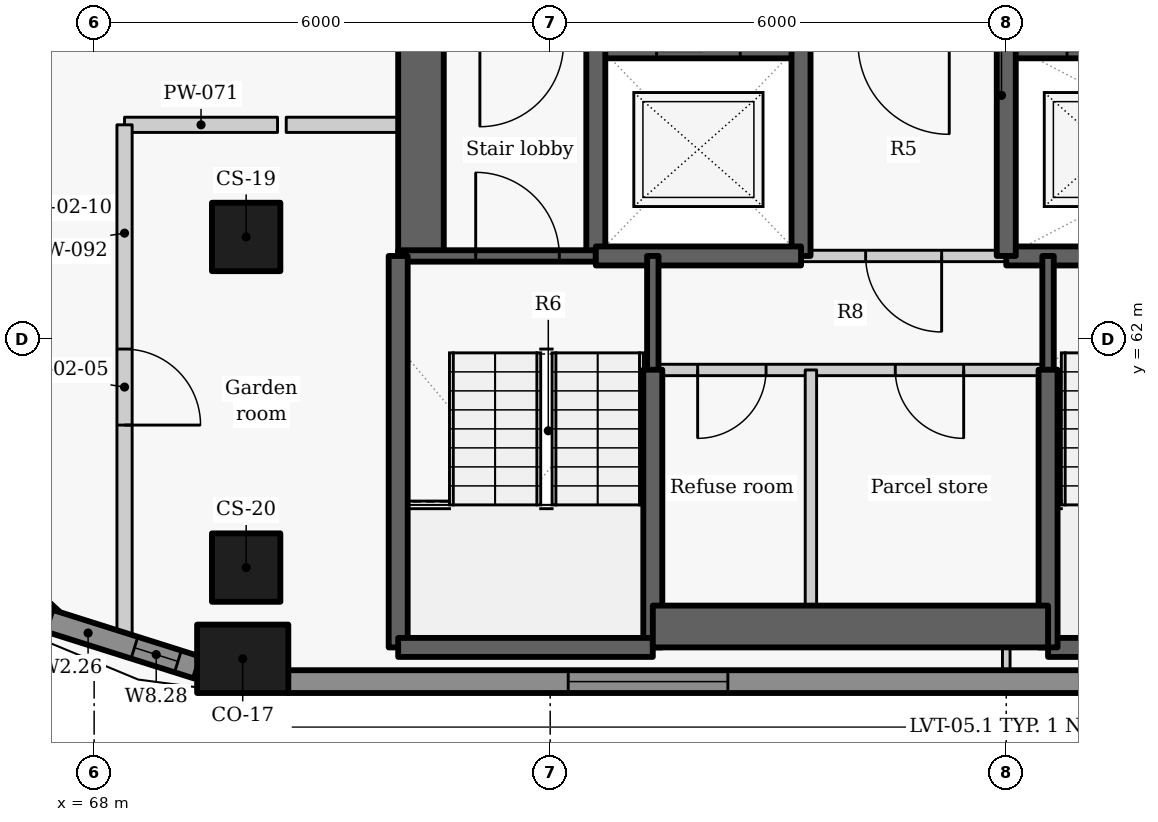
"""IFC4 building model, lengths in metres.
Left out: names, types, materials, properties, quantities, classifications, styles, units other than length and angle.
Written with IfcOpenShell. Run it as: python <this file> out.ifc"""

import sys

from ifc_helpers import new_model, si_unit, direction, frame, frame_2d, origin, origin_2d, place, context, subcontext, project, spatial, rectangle, extrude, element, fill, save


model = new_model("IFC4")
c1 = context("Model", 3, precision=1e-05, world=origin(), true_north=direction((0.0, 1.0)))
c2 = subcontext(c1, "Body", "Model", "MODEL_VIEW")
j1 = project(units=[si_unit("LENGTHUNIT", "METRE"), si_unit("PLANEANGLEUNIT", "RADIAN")], contexts=[c1])
p1 = place(None, origin())
s1 = spatial("IfcSite", under=j1, at=p1, CompositionType="ELEMENT")
p2 = place(p1, origin())
s2 = spatial("IfcBuilding", under=s1, at=p2, CompositionType="ELEMENT")
p3 = place(p2, frame((0.0, 0.0, 213.0)))
s3 = spatial("IfcBuildingStorey", under=s2, at=p3, CompositionType="ELEMENT", Elevation=213.0)
p4 = place(p3, frame((69.955, 57.8, 0.0), z_axis=(0.0, 0.0, 1.0), x_axis=(1.0, 0.0, 0.0)))
e1 = element("IfcColumn", 1, at=p4, inside=s3, PredefinedType="COLUMN", context=c2, shape_type="SweptSolid", body=[
    extrude(rectangle(XDim=1.2, YDim=0.9, at=origin_2d()), origin(), (0.0, 0.0, 1.0), 3.3),
])
for number, where, z_axis, x_axis in (
    (2, (70.0, 63.35, 0.0), (0.0, 0.0, 1.0), (0.0, -1.0, 0.0)),
    (3, (70.0, 59.0, 0.0), (0.0, 0.0, 1.0), (0.0, -1.0, 0.0)),
):
    element("IfcColumn", number, at=place(p3, frame(where, z_axis=z_axis, x_axis=x_axis)), inside=s3, PredefinedType="COLUMN", context=c2, shape_type="SweptSolid", body=[
        extrude(rectangle(XDim=0.9, YDim=0.9, at=origin_2d()), origin(), (0.0, 0.0, 1.0), 3.3),
    ])
p5 = place(p3, frame((66.022, 59.622, 0.0), z_axis=(0.0, 0.0, 1.0), x_axis=(0.734627852992, -0.678470277616, 0.0)))
e4 = element("IfcWall", 4, at=p5, inside=s3, PredefinedType="SOLIDWALL", context=c2, shape_type="SweptSolid", body=[
    extrude(rectangle(XDim=2.026, YDim=0.3, at=frame_2d((1.013, 0.0))), origin(), (0.0, 0.0, 1.0), 2.425),
])
p6 = place(p5, frame((0.313, 0.0, 0.9)))
e5 = element("IfcOpeningElement", 5, at=p6, cuts=e4, PredefinedType="OPENING", context=c2, shape_type="SweptSolid", body=[
    extrude(rectangle(XDim=0.6, YDim=1.1, at=frame_2d((0.3, 0.55))), frame((0.0, 0.16, 0.0), z_axis=(0.0, -1.0, 0.0), x_axis=(1.0, 0.0, 0.0)), (0.0, 0.0, 1.0), 0.32),
])
p7 = place(p3, frame((67.406, 58.302, 0.0), z_axis=(0.0, 0.0, 1.0), x_axis=(0.953537608367, -0.301274010545, 0.0)))
e6 = element("IfcWall", 6, at=p7, inside=s3, PredefinedType="SOLIDWALL", context=c2, shape_type="SweptSolid", body=[
    extrude(rectangle(XDim=2.048, YDim=0.3, at=frame_2d((1.024, 0.0))), origin(), (0.0, 0.0, 1.0), 2.425),
])
p8 = place(p7, frame((1.18, 0.0, 0.9)))
e7 = element("IfcOpeningElement", 7, at=p8, cuts=e6, PredefinedType="OPENING", context=c2, shape_type="SweptSolid", body=[
    extrude(rectangle(XDim=0.6, YDim=1.1, at=frame_2d((0.3, 0.55))), frame((0.0, 0.16, 0.0), z_axis=(0.0, -1.0, 0.0), x_axis=(1.0, 0.0, 0.0)), (0.0, 0.0, 1.0), 0.32),
])
p9 = place(p3, frame((70.551, 57.5, 0.0), z_axis=(0.0, 0.0, 1.0), x_axis=(1.0, 0.0, 0.0)))
e8 = element("IfcWall", 8, at=p9, inside=s3, PredefinedType="SOLIDWALL", context=c2, shape_type="SweptSolid", body=[
    extrude(rectangle(XDim=18.893, YDim=0.3, at=frame_2d((9.446, 0.0))), origin(), (0.0, 0.0, 1.0), 2.425),
])
p10 = place(p9, frame((3.687, 0.0, 0.9)))
e9 = element("IfcOpeningElement", 9, at=p10, cuts=e8, PredefinedType="OPENING", context=c2, shape_type="SweptSolid", body=[
    extrude(rectangle(XDim=2.1, YDim=1.1, at=frame_2d((1.05, 0.55))), frame((0.0, 0.16, 0.0), z_axis=(0.0, -1.0, 0.0), x_axis=(1.0, 0.0, 0.0)), (0.0, 0.0, 1.0), 0.32),
])
p11 = place(p9, frame((13.109, 0.0, 0.9)))
e10 = element("IfcOpeningElement", 10, at=p11, cuts=e8, PredefinedType="OPENING", context=c2, shape_type="SweptSolid", body=[
    extrude(rectangle(XDim=2.1, YDim=1.1, at=frame_2d((1.05, 0.55))), frame((0.0, 0.16, 0.0), z_axis=(0.0, -1.0, 0.0), x_axis=(1.0, 0.0, 0.0)), (0.0, 0.0, 1.0), 0.32),
])
p12 = place(p3, frame((72.3, 63.1, -0.275), z_axis=(0.0, 0.0, 1.0), x_axis=(0.0, 1.0, 0.0)))
e11 = element("IfcWall", 11, at=p12, inside=s3, PredefinedType="SHEAR", context=c2, shape_type="SweptSolid", body=[
    extrude(rectangle(XDim=9.1, YDim=0.6, at=frame_2d((4.55, 0.0))), origin(), (0.0, 0.0, 1.0), 3.3),
])
p13 = place(p12, frame((3.748, 0.0, 0.275)))
e12 = element("IfcOpeningElement", 12, at=p13, cuts=e11, PredefinedType="OPENING", context=c2, shape_type="SweptSolid", body=[
    extrude(rectangle(XDim=1.5, YDim=2.1, at=frame_2d((0.75, 1.05))), frame((0.0, 0.31, 0.0), z_axis=(0.0, -1.0, 0.0), x_axis=(1.0, 0.0, 0.0)), (0.0, 0.0, 1.0), 0.62),
])
p14 = place(p3, frame((74.597, 65.9, -0.275), z_axis=(0.0, 0.0, 1.0), x_axis=(1.0, 0.0, 0.0)))
e13 = element("IfcWall", 13, at=p14, inside=s3, PredefinedType="SHEAR", context=c2, shape_type="SweptSolid", body=[
    extrude(rectangle(XDim=2.706, YDim=0.4, at=frame_2d((1.353, 0.0))), origin(), (0.0, 0.0, 1.0), 3.3),
])
p15 = place(p14, frame((0.803, 0.0, 0.275)))
e14 = element("IfcOpeningElement", 14, at=p15, cuts=e13, PredefinedType="OPENING", context=c2, shape_type="SweptSolid", body=[
    extrude(rectangle(XDim=1.1, YDim=2.1, at=frame_2d((0.55, 1.05))), frame((0.0, 0.21, 0.0), z_axis=(0.0, -1.0, 0.0), x_axis=(1.0, 0.0, 0.0)), (0.0, 0.0, 1.0), 0.42),
])
p16 = place(p3, frame((79.997, 65.9, -0.275), z_axis=(0.0, 0.0, 1.0), x_axis=(1.0, 0.0, 0.0)))
e15 = element("IfcWall", 15, at=p16, inside=s3, PredefinedType="SHEAR", context=c2, shape_type="SweptSolid", body=[
    extrude(rectangle(XDim=5.406, YDim=0.4, at=frame_2d((2.703, 0.0))), origin(), (0.0, 0.0, 1.0), 3.3),
])
p17 = place(p16, frame((0.803, 0.0, 0.275)))
e16 = element("IfcOpeningElement", 16, at=p17, cuts=e15, PredefinedType="OPENING", context=c2, shape_type="SweptSolid", body=[
    extrude(rectangle(XDim=1.1, YDim=2.1, at=frame_2d((0.55, 1.05))), frame((0.0, 0.21, 0.0), z_axis=(0.0, -1.0, 0.0), x_axis=(1.0, 0.0, 0.0)), (0.0, 0.0, 1.0), 0.42),
])
p18 = place(p3, frame((74.6, 63.1, -0.275), z_axis=(0.0, 0.0, 1.0), x_axis=(0.0, 1.0, 0.0)))
e17 = element("IfcWall", 17, at=p18, inside=s3, PredefinedType="SHEAR", context=c2, shape_type="SweptSolid", body=[
    extrude(rectangle(XDim=2.8, YDim=0.25, at=frame_2d((1.4, 0.0))), origin(), (0.0, 0.0, 1.0), 3.3),
])
p19 = place(p3, frame((72.0, 63.1, -0.275), z_axis=(0.0, 0.0, 1.0), x_axis=(1.0, 0.0, 0.0)))
e18 = element("IfcWall", 18, at=p19, inside=s3, PredefinedType="SHEAR", context=c2, shape_type="SweptSolid", body=[
    extrude(rectangle(XDim=2.6, YDim=0.15, at=frame_2d((1.3, 0.0))), origin(), (0.0, 0.0, 1.0), 3.3),
])
p20 = place(p19, frame((1.02, 0.0, 0.275)))
e19 = element("IfcOpeningElement", 19, at=p20, cuts=e18, PredefinedType="OPENING", context=c2, shape_type="SweptSolid", body=[
    extrude(rectangle(XDim=1.1, YDim=2.1, at=frame_2d((0.55, 1.05))), frame((0.0, 0.085, 0.0), z_axis=(0.0, -1.0, 0.0), x_axis=(1.0, 0.0, 0.0)), (0.0, 0.0, 1.0), 0.17),
])
p21 = place(p3, frame((77.3, 63.1, -0.275), z_axis=(0.0, 0.0, 1.0), x_axis=(0.0, 1.0, 0.0)))
e20 = element("IfcWall", 20, at=p21, inside=s3, PredefinedType="SHEAR", context=c2, shape_type="SweptSolid", body=[
    extrude(rectangle(XDim=2.8, YDim=0.25, at=frame_2d((1.4, 0.0))), origin(), (0.0, 0.0, 1.0), 3.3),
])
p22 = place(p3, frame((74.6, 63.1, -0.275), z_axis=(0.0, 0.0, 1.0), x_axis=(1.0, 0.0, 0.0)))
e21 = element("IfcWall", 21, at=p22, inside=s3, PredefinedType="SHEAR", context=c2, shape_type="SweptSolid", body=[
    extrude(rectangle(XDim=2.7, YDim=0.25, at=frame_2d((1.35, 0.0))), origin(), (0.0, 0.0, 1.0), 3.3),
])
p23 = place(p3, frame((80.0, 63.1, -0.275), z_axis=(0.0, 0.0, 1.0), x_axis=(1.0, 0.0, 0.0)))
e22 = element("IfcWall", 22, at=p23, inside=s3, PredefinedType="SHEAR", context=c2, shape_type="SweptSolid", body=[
    extrude(rectangle(XDim=8.0, YDim=0.25, at=frame_2d((4.0, 0.0))), origin(), (0.0, 0.0, 1.0), 3.3),
])
p24 = place(p23, frame((3.849, 0.0, 0.275)))
e23 = element("IfcOpeningElement", 23, at=p24, cuts=e22, PredefinedType="OPENING", context=c2, shape_type="SweptSolid", body=[
    extrude(rectangle(XDim=1.1, YDim=2.1, at=frame_2d((0.55, 1.05))), frame((0.0, 0.135, 0.0), z_axis=(0.0, -1.0, 0.0), x_axis=(1.0, 0.0, 0.0)), (0.0, 0.0, 1.0), 0.27),
])
p25 = place(p3, frame((80.0, 63.1, -0.275), z_axis=(0.0, 0.0, 1.0), x_axis=(0.0, 1.0, 0.0)))
e24 = element("IfcWall", 24, at=p25, inside=s3, PredefinedType="SHEAR", context=c2, shape_type="SweptSolid", body=[
    extrude(rectangle(XDim=2.8, YDim=0.25, at=frame_2d((1.4, 0.0))), origin(), (0.0, 0.0, 1.0), 3.3),
])
p26 = place(p3, frame((80.0, 63.1, 0.0), z_axis=(0.0, 0.0, 1.0), x_axis=(-1.0, 0.0, 0.0)))
e25 = element("IfcWall", 25, at=p26, inside=s3, PredefinedType="PARTITIONING", context=c2, shape_type="SweptSolid", body=[
    extrude(rectangle(XDim=2.7, YDim=0.15, at=frame_2d((1.35, 0.0))), origin(), (0.0, 0.0, 1.0), 3.025),
])
p27 = place(p26, frame((0.85, 0.0, 0.0)))
e26 = element("IfcOpeningElement", 26, at=p27, cuts=e25, PredefinedType="OPENING", context=c2, shape_type="SweptSolid", body=[
    extrude(rectangle(XDim=1.0, YDim=2.1, at=frame_2d((0.5, 1.05))), frame((0.0, 0.085, 0.0), z_axis=(0.0, -1.0, 0.0), x_axis=(1.0, 0.0, 0.0)), (0.0, 0.0, 1.0), 0.17),
])
p28 = place(p3, frame((75.35, 61.597, -0.275), z_axis=(0.0, 0.0, 1.0), x_axis=(0.0, 1.0, 0.0)))
e27 = element("IfcWall", 27, at=p28, inside=s3, PredefinedType="SHEAR", context=c2, shape_type="SweptSolid", body=[
    extrude(rectangle(XDim=1.503, YDim=0.15, at=frame_2d((0.751, 0.0))), origin(), (0.0, 0.0, 1.0), 3.3),
])
p29 = place(p3, frame((75.35, 57.95, -0.275), z_axis=(0.0, 0.0, 1.0), x_axis=(0.0, 1.0, 0.0)))
e28 = element("IfcWall", 28, at=p29, inside=s3, PredefinedType="SHEAR", context=c2, shape_type="SweptSolid", body=[
    extrude(rectangle(XDim=3.653, YDim=0.25, at=frame_2d((1.827, 0.0))), origin(), (0.0, 0.0, 1.0), 3.3),
])
p30 = place(p3, frame((72.0, 57.95, -0.275), z_axis=(0.0, 0.0, 1.0), x_axis=(0.0, 1.0, 0.0)))
e29 = element("IfcWall", 29, at=p30, inside=s3, PredefinedType="SHEAR", context=c2, shape_type="SweptSolid", body=[
    extrude(rectangle(XDim=5.15, YDim=0.25, at=frame_2d((2.575, 0.0))), origin(), (0.0, 0.0, 1.0), 3.3),
])
p31 = place(p3, frame((72.0, 57.95, -0.275), z_axis=(0.0, 0.0, 1.0), x_axis=(1.0, 0.0, 0.0)))
e30 = element("IfcWall", 30, at=p31, inside=s3, PredefinedType="SHEAR", context=c2, shape_type="SweptSolid", body=[
    extrude(rectangle(XDim=3.35, YDim=0.25, at=frame_2d((1.675, 0.0))), origin(), (0.0, 0.0, 1.0), 3.3),
])
p32 = place(p3, frame((80.55, 57.95, -0.275), z_axis=(0.0, 0.0, 1.0), x_axis=(1.0, 0.0, 0.0)))
e31 = element("IfcWall", 31, at=p32, inside=s3, PredefinedType="SHEAR", context=c2, shape_type="SweptSolid", body=[
    extrude(rectangle(XDim=2.85, YDim=0.25, at=frame_2d((1.425, 0.0))), origin(), (0.0, 0.0, 1.0), 3.3),
])
p33 = place(p3, frame((80.55, 61.597, -0.275), z_axis=(0.0, 0.0, 1.0), x_axis=(0.0, 1.0, 0.0)))
e32 = element("IfcWall", 32, at=p33, inside=s3, PredefinedType="SHEAR", context=c2, shape_type="SweptSolid", body=[
    extrude(rectangle(XDim=1.503, YDim=0.15, at=frame_2d((0.751, 0.0))), origin(), (0.0, 0.0, 1.0), 3.3),
])
p34 = place(p3, frame((80.55, 57.95, -0.275), z_axis=(0.0, 0.0, 1.0), x_axis=(0.0, 1.0, 0.0)))
e33 = element("IfcWall", 33, at=p34, inside=s3, PredefinedType="SHEAR", context=c2, shape_type="SweptSolid", body=[
    extrude(rectangle(XDim=3.653, YDim=0.25, at=frame_2d((1.827, 0.0))), origin(), (0.0, 0.0, 1.0), 3.3),
])
p35 = place(p3, frame((75.35, 58.225, -0.275), z_axis=(0.0, 0.0, 1.0), x_axis=(1.0, 0.0, 0.0)))
e34 = element("IfcWall", 34, at=p35, inside=s3, PredefinedType="SHEAR", context=c2, shape_type="SweptSolid", body=[
    extrude(rectangle(XDim=5.2, YDim=0.55, at=frame_2d((2.6, 0.0))), origin(), (0.0, 0.0, 1.0), 3.3),
])
p36 = place(p3, frame((80.55, 61.6, 0.0), z_axis=(0.0, 0.0, 1.0), x_axis=(-1.0, 0.0, 0.0)))
e35 = element("IfcWall", 35, at=p36, inside=s3, PredefinedType="PARTITIONING", context=c2, shape_type="SweptSolid", body=[
    extrude(rectangle(XDim=5.2, YDim=0.15, at=frame_2d((2.6, 0.0))), origin(), (0.0, 0.0, 1.0), 3.025),
])
p37 = place(p36, frame((3.71, 0.0, 0.0)))
e36 = element("IfcOpeningElement", 36, at=p37, cuts=e35, PredefinedType="OPENING", context=c2, shape_type="SweptSolid", body=[
    extrude(rectangle(XDim=0.9, YDim=2.1, at=frame_2d((0.45, 1.05))), frame((0.0, 0.085, 0.0), z_axis=(0.0, -1.0, 0.0), x_axis=(1.0, 0.0, 0.0)), (0.0, 0.0, 1.0), 0.17),
])
p38 = place(p36, frame((1.11, 0.0, 0.0)))
e37 = element("IfcOpeningElement", 37, at=p38, cuts=e35, PredefinedType="OPENING", context=c2, shape_type="SweptSolid", body=[
    extrude(rectangle(XDim=0.9, YDim=2.1, at=frame_2d((0.45, 1.05))), frame((0.0, 0.085, 0.0), z_axis=(0.0, -1.0, 0.0), x_axis=(1.0, 0.0, 0.0)), (0.0, 0.0, 1.0), 0.17),
])
p39 = place(p3, frame((77.43, 57.95, 0.0), z_axis=(0.0, 0.0, 1.0), x_axis=(0.0, 1.0, 0.0)))
e38 = element("IfcWall", 38, at=p39, inside=s3, PredefinedType="PARTITIONING", context=c2, shape_type="SweptSolid", body=[
    extrude(rectangle(XDim=3.65, YDim=0.15, at=frame_2d((1.825, 0.0))), origin(), (0.0, 0.0, 1.0), 3.025),
])
p40 = place(p3, frame((68.4, 64.825, 0.0), z_axis=(0.0, 0.0, 1.0), x_axis=(1.0, 0.0, 0.0)))
e39 = element("IfcWall", 39, at=p40, inside=s3, PredefinedType="PARTITIONING", context=c2, shape_type="SweptSolid", body=[
    extrude(rectangle(XDim=2.013, YDim=0.2, at=frame_2d((1.006, 0.0))), origin(), (0.0, 0.0, 1.0), 2.505),
])
p41 = place(p3, frame((70.527, 64.825, 0.0), z_axis=(0.0, 0.0, 1.0), x_axis=(1.0, 0.0, 0.0)))
e40 = element("IfcWall", 40, at=p41, inside=s3, PredefinedType="PARTITIONING", context=c2, shape_type="SweptSolid", body=[
    extrude(rectangle(XDim=1.473, YDim=0.2, at=frame_2d((0.736, 0.0))), origin(), (0.0, 0.0, 1.0), 3.025),
])
p42 = place(p3, frame((68.4, 64.825, 0.0), z_axis=(0.0, 0.0, 1.0), x_axis=(0.0, -1.0, 0.0)))
e41 = element("IfcWall", 41, at=p42, inside=s3, PredefinedType="PARTITIONING", context=c2, shape_type="SweptSolid", body=[
    extrude(rectangle(XDim=6.899, YDim=0.2, at=frame_2d((3.449, 0.0))), origin(), (0.0, 0.0, 1.0), 2.405),
])
p43 = place(p42, frame((2.95, 0.0, 0.0)))
e42 = element("IfcOpeningElement", 42, at=p43, cuts=e41, PredefinedType="OPENING", context=c2, shape_type="SweptSolid", body=[
    extrude(rectangle(XDim=1.0, YDim=2.1, at=frame_2d((0.5, 1.05))), frame((0.0, 0.11, 0.0), z_axis=(0.0, -1.0, 0.0), x_axis=(1.0, 0.0, 0.0)), (0.0, 0.0, 1.0), 0.22),
])
p44 = place(p3, frame((80.0, 57.65, 0.0), z_axis=(0.0, 0.0, 1.0), x_axis=(0.0, 1.0, 0.0)))
e43 = element("IfcWall", 43, at=p44, inside=s3, PredefinedType="PARTITIONING", context=c2, shape_type="SweptSolid", body=[
    extrude(rectangle(XDim=0.3, YDim=0.1, at=frame_2d((0.15, 0.0))), origin(), (0.0, 0.0, 1.0), 3.025),
])
p45 = place(p8, origin())
e44 = element("IfcWindow", 44, at=p45, inside=s3, PartitioningType="SINGLE_PANEL", PredefinedType="WINDOW", context=c2, shape_type="SweptSolid", body=[
    extrude(rectangle(XDim=0.6, YDim=1.1, at=frame_2d((0.3, 0.55))), frame((0.0, 0.03, 0.0), z_axis=(0.0, -1.0, 0.0), x_axis=(1.0, 0.0, 0.0)), (0.0, 0.0, 1.0), 0.06),
])
fill(e7, e44)
p46 = place(p10, origin())
e45 = element("IfcWindow", 45, at=p46, inside=s3, PartitioningType="SINGLE_PANEL", PredefinedType="WINDOW", context=c2, shape_type="SweptSolid", body=[
    extrude(rectangle(XDim=2.1, YDim=1.1, at=frame_2d((1.05, 0.55))), frame((0.0, 0.03, 0.0), z_axis=(0.0, -1.0, 0.0), x_axis=(1.0, 0.0, 0.0)), (0.0, 0.0, 1.0), 0.06),
])
fill(e9, e45)
p47 = place(p27, origin())
e46 = element("IfcDoor", 46, at=p47, inside=s3, OperationType="SINGLE_SWING_LEFT", PredefinedType="DOOR", context=c2, shape_type="SweptSolid", body=[
    extrude(rectangle(XDim=1.0, YDim=2.1, at=frame_2d((0.5, 1.05))), frame((0.0, 0.025, 0.0), z_axis=(0.0, -1.0, 0.0), x_axis=(1.0, 0.0, 0.0)), (0.0, 0.0, 1.0), 0.05),
])
fill(e26, e46)
p48 = place(p37, origin())
e47 = element("IfcDoor", 47, at=p48, inside=s3, OperationType="SINGLE_SWING_RIGHT", PredefinedType="DOOR", context=c2, shape_type="SweptSolid", body=[
    extrude(rectangle(XDim=0.9, YDim=2.1, at=frame_2d((0.45, 1.05))), frame((0.0, 0.025, 0.0), z_axis=(0.0, -1.0, 0.0), x_axis=(1.0, 0.0, 0.0)), (0.0, 0.0, 1.0), 0.05),
])
fill(e36, e47)
p49 = place(p38, origin())
e48 = element("IfcDoor", 48, at=p49, inside=s3, OperationType="SINGLE_SWING_LEFT", PredefinedType="DOOR", context=c2, shape_type="SweptSolid", body=[
    extrude(rectangle(XDim=0.9, YDim=2.1, at=frame_2d((0.45, 1.05))), frame((0.0, 0.025, 0.0), z_axis=(0.0, -1.0, 0.0), x_axis=(1.0, 0.0, 0.0)), (0.0, 0.0, 1.0), 0.05),
])
fill(e37, e48)
p50 = place(p20, origin())
e49 = element("IfcDoor", 49, at=p50, inside=s3, OperationType="SINGLE_SWING_LEFT", PredefinedType="DOOR", context=c2, shape_type="SweptSolid", body=[
    extrude(rectangle(XDim=1.1, YDim=2.1, at=frame_2d((0.55, 1.05))), frame((0.0, 0.025, 0.0), z_axis=(0.0, -1.0, 0.0), x_axis=(1.0, 0.0, 0.0)), (0.0, 0.0, 1.0), 0.05),
])
fill(e19, e49)
p51 = place(p43, origin())
e50 = element("IfcDoor", 50, at=p51, inside=s3, OperationType="SINGLE_SWING_RIGHT", PredefinedType="DOOR", context=c2, shape_type="SweptSolid", body=[
    extrude(rectangle(XDim=1.0, YDim=2.1, at=frame_2d((0.5, 1.05))), frame((0.0, 0.025, 0.0), z_axis=(0.0, -1.0, 0.0), x_axis=(1.0, 0.0, 0.0)), (0.0, 0.0, 1.0), 0.05),
])
fill(e42, e50)
save(model, sys.argv[1])
